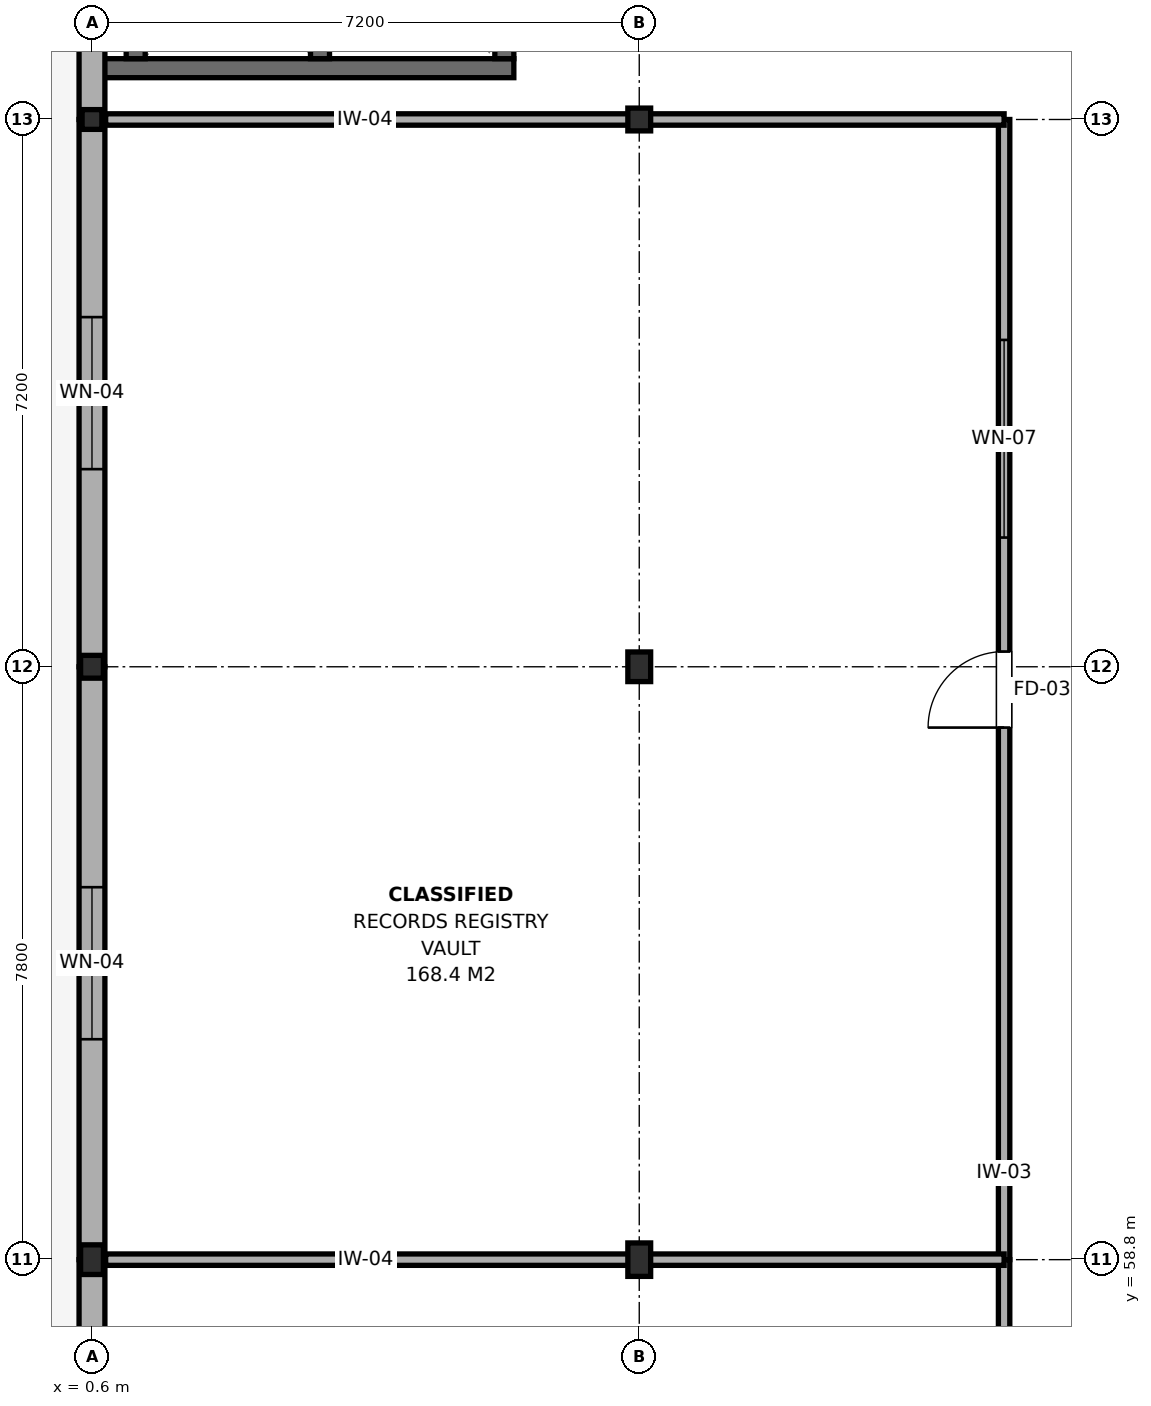
"""IFC4 building model, lengths in metres.
Left out: names, types, materials, properties, quantities, classifications, styles, units other than length and angle.
Written with IfcOpenShell. Run it as: python <this file> out.ifc"""

import sys

from ifc_helpers import new_model, si_unit, direction, frame, frame_2d, origin, origin_2d, place, context, subcontext, project, spatial, rectangle, i_section, extrude, element, fill, save


model = new_model("IFC4")
c1 = context("Model", 3, precision=1e-05, world=origin(), true_north=direction((0.0, 1.0)))
c2 = subcontext(c1, "Body", "Model", "MODEL_VIEW")
j1 = project(units=[si_unit("LENGTHUNIT", "METRE"), si_unit("PLANEANGLEUNIT", "RADIAN")], contexts=[c1])
p1 = place(None, origin())
s1 = spatial("IfcSite", under=j1, at=p1, CompositionType="ELEMENT")
p2 = place(p1, origin())
s2 = spatial("IfcBuilding", under=s1, at=p2, CompositionType="ELEMENT")
p3 = place(p2, frame((0.0, 0.0, 28.8)))
s3 = spatial("IfcBuildingStorey", under=s2, at=p3, CompositionType="ELEMENT", Elevation=28.8)
p4 = place(p3, frame((0.6, 58.8, 0.0), z_axis=(0.0, 0.0, 1.0), x_axis=(1.0, 0.0, 0.0)))
e1 = element("IfcColumn", 1, at=p4, inside=s3, PredefinedType="COLUMN", context=c2, shape_type="SweptSolid", body=[
    extrude(i_section(OverallWidth=0.3, OverallDepth=0.39, WebThickness=0.011, FlangeThickness=0.019, FilletRadius=0.027, at=origin_2d()), origin(), (0.0, 0.0, 1.0), 3.9),
])
p5 = place(p3, frame((0.6, 66.6, 0.0), z_axis=(0.0, 0.0, 1.0), x_axis=(1.0, 0.0, 0.0)))
e2 = element("IfcColumn", 2, at=p5, inside=s3, PredefinedType="COLUMN", context=c2, shape_type="SweptSolid", body=[
    extrude(i_section(OverallWidth=0.3, OverallDepth=0.3, WebThickness=0.011, FlangeThickness=0.019, FilletRadius=0.027, at=origin_2d()), origin(), (0.0, 0.0, 1.0), 3.9),
])
p6 = place(p3, frame((0.6, 73.8, 0.0), z_axis=(0.0, 0.0, 1.0), x_axis=(1.0, 0.0, 0.0)))
e3 = element("IfcColumn", 3, at=p6, inside=s3, PredefinedType="COLUMN", context=c2, shape_type="SweptSolid", body=[
    extrude(i_section(OverallWidth=0.26, OverallDepth=0.26, WebThickness=0.01, FlangeThickness=0.018, FilletRadius=0.024, at=origin_2d()), origin(), (0.0, 0.0, 1.0), 3.9),
])
p7 = place(p3, frame((7.8, 58.8, 0.0), z_axis=(0.0, 0.0, 1.0), x_axis=(1.0, 0.0, 0.0)))
e4 = element("IfcColumn", 4, at=p7, inside=s3, PredefinedType="COLUMN", context=c2, shape_type="SweptSolid", body=[
    extrude(i_section(OverallWidth=0.3, OverallDepth=0.44, WebThickness=0.011, FlangeThickness=0.021, FilletRadius=0.027, at=origin_2d()), origin(), (0.0, 0.0, 1.0), 3.9),
])
p8 = place(p3, frame((7.8, 66.6, 0.0), z_axis=(0.0, 0.0, 1.0), x_axis=(1.0, 0.0, 0.0)))
e5 = element("IfcColumn", 5, at=p8, inside=s3, PredefinedType="COLUMN", context=c2, shape_type="SweptSolid", body=[
    extrude(i_section(OverallWidth=0.3, OverallDepth=0.39, WebThickness=0.011, FlangeThickness=0.019, FilletRadius=0.027, at=origin_2d()), origin(), (0.0, 0.0, 1.0), 3.9),
])
p9 = place(p3, frame((7.8, 73.8, 0.0), z_axis=(0.0, 0.0, 1.0), x_axis=(1.0, 0.0, 0.0)))
e6 = element("IfcColumn", 6, at=p9, inside=s3, PredefinedType="COLUMN", context=c2, shape_type="SweptSolid", body=[
    extrude(i_section(OverallWidth=0.3, OverallDepth=0.3, WebThickness=0.011, FlangeThickness=0.019, FilletRadius=0.027, at=origin_2d()), origin(), (0.0, 0.0, 1.0), 3.9),
])
p10 = place(p3, frame((0.75, 74.475, 0.0), z_axis=(0.0, 0.0, 1.0), x_axis=(1.0, 0.0, 0.0)))
e7 = element("IfcWall", 7, at=p10, inside=s3, PredefinedType="SHEAR", context=c2, shape_type="SweptSolid", body=[
    extrude(rectangle(XDim=5.4, YDim=0.25, at=frame_2d((2.7, 0.0))), origin(), (0.0, 0.0, 1.0), 3.72),
])
for number, where, z_axis, x_axis in (
    (8, (1.175, 74.6, 0.0), (0.0, 0.0, 1.0), (0.0, 1.0, 0.0)),
    (9, (3.6, 74.6, 0.0), (0.0, 0.0, 1.0), (0.0, 1.0, 0.0)),
):
    element("IfcWall", number, at=place(p3, frame(where, z_axis=z_axis, x_axis=x_axis)), inside=s3, PredefinedType="SHEAR", context=c2, shape_type="SweptSolid", body=[
        extrude(rectangle(XDim=3.0, YDim=0.25, at=frame_2d((1.5, 0.0))), origin(), (0.0, 0.0, 1.0), 3.72),
    ])
p11 = place(p3, frame((6.025, 74.6, 0.0), z_axis=(0.0, 0.0, 1.0), x_axis=(0.0, 1.0, 0.0)))
e10 = element("IfcWall", 10, at=p11, inside=s3, PredefinedType="SHEAR", context=c2, shape_type="SweptSolid", body=[
    extrude(rectangle(XDim=2.4, YDim=0.25, at=frame_2d((1.2, 0.0))), origin(), (0.0, 0.0, 1.0), 3.72),
])
p12 = place(p11, frame((0.7, 0.0, 0.0)))
e11 = element("IfcOpeningElement", 11, at=p12, cuts=e10, PredefinedType="OPENING", context=c2, shape_type="SweptSolid", body=[
    extrude(rectangle(XDim=1.0, YDim=2.15, at=frame_2d((0.5, 1.075))), frame((0.0, 0.14, 0.0), z_axis=(0.0, -1.0, 0.0), x_axis=(1.0, 0.0, 0.0)), (0.0, 0.0, 1.0), 0.28),
])
p13 = place(p3, frame((0.6, 53.2, 0.0), z_axis=(0.0, 0.0, 1.0), x_axis=(0.0, 1.0, 0.0)))
e12 = element("IfcWall", 12, at=p13, inside=s3, PredefinedType="SOLIDWALL", context=c2, shape_type="SweptSolid", body=[
    extrude(rectangle(XDim=5.6, YDim=0.34, at=frame_2d((2.8, 0.0))), origin(), (0.0, 0.0, 1.0), 3.215),
])
p14 = place(p13, frame((1.8, 0.0, 0.9)))
e13 = element("IfcOpeningElement", 13, at=p14, cuts=e12, PredefinedType="OPENING", context=c2, shape_type="SweptSolid", body=[
    extrude(rectangle(XDim=2.0, YDim=1.8, at=frame_2d((1.0, 0.9))), frame((0.0, 0.185, 0.0), z_axis=(0.0, -1.0, 0.0), x_axis=(1.0, 0.0, 0.0)), (0.0, 0.0, 1.0), 0.37),
])
p15 = place(p3, frame((0.6, 58.8, 0.0), z_axis=(0.0, 0.0, 1.0), x_axis=(0.0, 1.0, 0.0)))
e14 = element("IfcWall", 14, at=p15, inside=s3, PredefinedType="SOLIDWALL", context=c2, shape_type="SweptSolid", body=[
    extrude(rectangle(XDim=7.8, YDim=0.34, at=frame_2d((3.9, 0.0))), origin(), (0.0, 0.0, 1.0), 3.265),
])
p16 = place(p15, frame((2.9, 0.0, 0.9)))
e15 = element("IfcOpeningElement", 15, at=p16, cuts=e14, PredefinedType="OPENING", context=c2, shape_type="SweptSolid", body=[
    extrude(rectangle(XDim=2.0, YDim=1.8, at=frame_2d((1.0, 0.9))), frame((0.0, 0.185, 0.0), z_axis=(0.0, -1.0, 0.0), x_axis=(1.0, 0.0, 0.0)), (0.0, 0.0, 1.0), 0.37),
])
p17 = place(p3, frame((0.6, 66.6, 0.0), z_axis=(0.0, 0.0, 1.0), x_axis=(0.0, 1.0, 0.0)))
e16 = element("IfcWall", 16, at=p17, inside=s3, PredefinedType="SOLIDWALL", context=c2, shape_type="SweptSolid", body=[
    extrude(rectangle(XDim=7.2, YDim=0.34, at=frame_2d((3.6, 0.0))), origin(), (0.0, 0.0, 1.0), 3.115),
])
p18 = place(p17, frame((2.6, 0.0, 0.9)))
e17 = element("IfcOpeningElement", 17, at=p18, cuts=e16, PredefinedType="OPENING", context=c2, shape_type="SweptSolid", body=[
    extrude(rectangle(XDim=2.0, YDim=1.8, at=frame_2d((1.0, 0.9))), frame((0.0, 0.185, 0.0), z_axis=(0.0, -1.0, 0.0), x_axis=(1.0, 0.0, 0.0)), (0.0, 0.0, 1.0), 0.37),
])
p19 = place(p3, frame((0.6, 73.8, 0.0), z_axis=(0.0, 0.0, 1.0), x_axis=(0.0, 1.0, 0.0)))
e18 = element("IfcWall", 18, at=p19, inside=s3, PredefinedType="SOLIDWALL", context=c2, shape_type="SweptSolid", body=[
    extrude(rectangle(XDim=7.2, YDim=0.34, at=frame_2d((3.6, 0.0))), origin(), (0.0, 0.0, 1.0), 3.115),
])
p20 = place(p3, frame((12.6, 40.0, 0.0), z_axis=(0.0, 0.0, 1.0), x_axis=(0.0, 1.0, 0.0)))
e19 = element("IfcWall", 19, at=p20, inside=s3, PredefinedType="PARTITIONING", context=c2, shape_type="SweptSolid", body=[
    extrude(rectangle(XDim=18.8, YDim=0.15, at=frame_2d((9.4, 0.0))), origin(), (0.0, 0.0, 1.0), 3.165),
])
p21 = place(p20, frame((8.6, 0.0, 0.0)))
e20 = element("IfcOpeningElement", 20, at=p21, cuts=e19, PredefinedType="OPENING", context=c2, shape_type="SweptSolid", body=[
    extrude(rectangle(XDim=1.6, YDim=2.15, at=frame_2d((0.8, 1.075))), frame((0.0, 0.09, 0.0), z_axis=(0.0, -1.0, 0.0), x_axis=(1.0, 0.0, 0.0)), (0.0, 0.0, 1.0), 0.18),
])
p22 = place(p20, frame((3.4, 0.0, 0.95)))
e21 = element("IfcOpeningElement", 21, at=p22, cuts=e19, PredefinedType="OPENING", context=c2, shape_type="SweptSolid", body=[
    extrude(rectangle(XDim=2.6, YDim=1.5, at=frame_2d((1.3, 0.75))), frame((0.0, 0.09, 0.0), z_axis=(0.0, -1.0, 0.0), x_axis=(1.0, 0.0, 0.0)), (0.0, 0.0, 1.0), 0.18),
])
p23 = place(p20, frame((12.8, 0.0, 0.95)))
e22 = element("IfcOpeningElement", 22, at=p23, cuts=e19, PredefinedType="OPENING", context=c2, shape_type="SweptSolid", body=[
    extrude(rectangle(XDim=2.6, YDim=1.5, at=frame_2d((1.3, 0.75))), frame((0.0, 0.09, 0.0), z_axis=(0.0, -1.0, 0.0), x_axis=(1.0, 0.0, 0.0)), (0.0, 0.0, 1.0), 0.18),
])
p24 = place(p3, frame((12.6, 58.8, 0.0), z_axis=(0.0, 0.0, 1.0), x_axis=(0.0, 1.0, 0.0)))
e23 = element("IfcWall", 23, at=p24, inside=s3, PredefinedType="PARTITIONING", context=c2, shape_type="SweptSolid", body=[
    extrude(rectangle(XDim=15.0, YDim=0.15, at=frame_2d((7.5, 0.0))), origin(), (0.0, 0.0, 1.0), 3.165),
])
p25 = place(p24, frame((7.0, 0.0, 0.0)))
e24 = element("IfcOpeningElement", 24, at=p25, cuts=e23, PredefinedType="OPENING", context=c2, shape_type="SweptSolid", body=[
    extrude(rectangle(XDim=1.0, YDim=2.15, at=frame_2d((0.5, 1.075))), frame((0.0, 0.09, 0.0), z_axis=(0.0, -1.0, 0.0), x_axis=(1.0, 0.0, 0.0)), (0.0, 0.0, 1.0), 0.18),
])
p26 = place(p24, frame((9.5, 0.0, 0.95)))
e25 = element("IfcOpeningElement", 25, at=p26, cuts=e23, PredefinedType="OPENING", context=c2, shape_type="SweptSolid", body=[
    extrude(rectangle(XDim=2.6, YDim=1.5, at=frame_2d((1.3, 0.75))), frame((0.0, 0.09, 0.0), z_axis=(0.0, -1.0, 0.0), x_axis=(1.0, 0.0, 0.0)), (0.0, 0.0, 1.0), 0.18),
])
for number, where, z_axis, x_axis in (
    (26, (0.78, 58.8, 0.0), (0.0, 0.0, 1.0), (1.0, 0.0, 0.0)),
    (27, (0.78, 73.8, 0.0), (0.0, 0.0, 1.0), (1.0, 0.0, 0.0)),
):
    element("IfcWall", number, at=place(p3, frame(where, z_axis=z_axis, x_axis=x_axis)), inside=s3, PredefinedType="PARTITIONING", context=c2, shape_type="SweptSolid", body=[
        extrude(rectangle(XDim=11.82, YDim=0.15, at=frame_2d((5.91, 0.0))), origin(), (0.0, 0.0, 1.0), 3.115),
    ])
p27 = place(p16, origin())
e28 = element("IfcWindow", 28, at=p27, inside=s3, PartitioningType="SINGLE_PANEL", PredefinedType="WINDOW", context=c2, shape_type="SweptSolid", body=[
    extrude(rectangle(XDim=2.0, YDim=1.8, at=frame_2d((1.0, 0.9))), frame((0.0, 0.03, 0.0), z_axis=(0.0, -1.0, 0.0), x_axis=(1.0, 0.0, 0.0)), (0.0, 0.0, 1.0), 0.06),
])
fill(e15, e28)
p28 = place(p18, origin())
e29 = element("IfcWindow", 29, at=p28, inside=s3, PartitioningType="SINGLE_PANEL", PredefinedType="WINDOW", context=c2, shape_type="SweptSolid", body=[
    extrude(rectangle(XDim=2.0, YDim=1.8, at=frame_2d((1.0, 0.9))), frame((0.0, 0.03, 0.0), z_axis=(0.0, -1.0, 0.0), x_axis=(1.0, 0.0, 0.0)), (0.0, 0.0, 1.0), 0.06),
])
fill(e17, e29)
p29 = place(p25, origin())
e30 = element("IfcDoor", 30, at=p29, inside=s3, OperationType="SINGLE_SWING_LEFT", PredefinedType="DOOR", context=c2, shape_type="SweptSolid", body=[
    extrude(rectangle(XDim=1.0, YDim=2.15, at=frame_2d((0.5, 1.075))), frame((0.0, 0.025, 0.0), z_axis=(0.0, -1.0, 0.0), x_axis=(1.0, 0.0, 0.0)), (0.0, 0.0, 1.0), 0.05),
])
fill(e24, e30)
p30 = place(p26, origin())
e31 = element("IfcWindow", 31, at=p30, inside=s3, PartitioningType="SINGLE_PANEL", PredefinedType="WINDOW", context=c2, shape_type="SweptSolid", body=[
    extrude(rectangle(XDim=2.6, YDim=1.5, at=frame_2d((1.3, 0.75))), frame((0.0, 0.03, 0.0), z_axis=(0.0, -1.0, 0.0), x_axis=(1.0, 0.0, 0.0)), (0.0, 0.0, 1.0), 0.06),
])
fill(e25, e31)
save(model, sys.argv[1])
